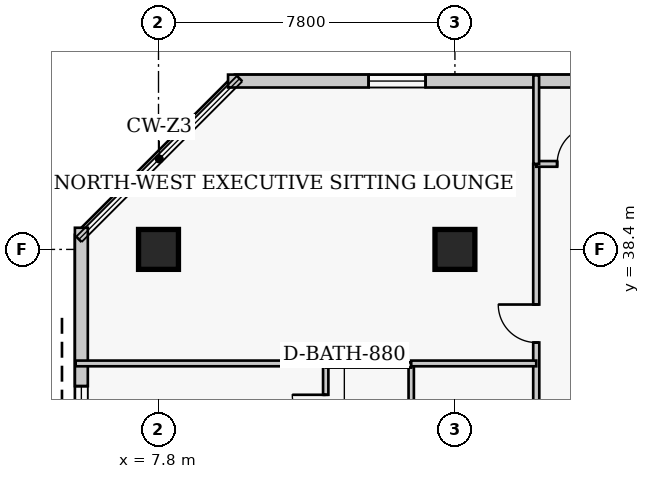
"""IFC4 building model, lengths in metres.
Left out: names, types, materials, properties, quantities, classifications, styles, units other than length and angle.
Written with IfcOpenShell. Run it as: python <this file> out.ifc"""

import sys

from ifc_helpers import new_model, si_unit, direction, frame, frame_2d, origin, origin_2d, place, context, subcontext, project, spatial, rectangle, extrude, element, fill, save


model = new_model("IFC4")
c1 = context("Model", 3, precision=1e-05, world=origin(), true_north=direction((0.0, 1.0)))
c2 = subcontext(c1, "Body", "Model", "MODEL_VIEW")
j1 = project(units=[si_unit("LENGTHUNIT", "METRE"), si_unit("PLANEANGLEUNIT", "RADIAN")], contexts=[c1])
p1 = place(None, origin())
s1 = spatial("IfcSite", under=j1, at=p1, CompositionType="ELEMENT")
p2 = place(p1, origin())
s2 = spatial("IfcBuilding", under=s1, at=p2, CompositionType="ELEMENT")
p3 = place(p2, frame((0.0, 0.0, 172.6)))
s3 = spatial("IfcBuildingStorey", under=s2, at=p3, CompositionType="ELEMENT", Elevation=172.6)
for number, where, z_axis, x_axis in (
    (1, (7.8, 38.4, 0.0), (0.0, 0.0, 1.0), (1.0, 0.0, 0.0)),
    (2, (15.6, 38.4, 0.0), (0.0, 0.0, 1.0), (1.0, 0.0, 0.0)),
):
    element("IfcColumn", number, at=place(p3, frame(where, z_axis=z_axis, x_axis=x_axis)), inside=s3, PredefinedType="COLUMN", context=c2, shape_type="SweptSolid", body=[
        extrude(rectangle(XDim=1.05, YDim=1.05, at=origin_2d()), origin(), (0.0, 0.0, 1.0), 3.8),
    ])
p4 = place(p3, frame((36.32, 42.83, 0.0), z_axis=(0.0, 0.0, 1.0), x_axis=(-1.0, 0.0, 0.0)))
e3 = element("IfcWall", 3, at=p4, inside=s3, PredefinedType="SOLIDWALL", context=c2, shape_type="SweptSolid", body=[
    extrude(rectangle(XDim=26.69, YDim=0.34, at=frame_2d((13.345, 0.0))), origin(), (0.0, 0.0, 1.0), 3.55),
])
p5 = place(p4, frame((2.548, 0.0, 0.85)))
e4 = element("IfcOpeningElement", 4, at=p5, cuts=e3, PredefinedType="OPENING", context=c2, shape_type="SweptSolid", body=[
    extrude(rectangle(XDim=1.5, YDim=1.75, at=frame_2d((0.75, 0.875))), frame((0.0, 0.18, 0.0), z_axis=(0.0, -1.0, 0.0), x_axis=(1.0, 0.0, 0.0)), (0.0, 0.0, 1.0), 0.36),
])
p6 = place(p4, frame((12.595, 0.0, 0.85)))
e5 = element("IfcOpeningElement", 5, at=p6, cuts=e3, PredefinedType="OPENING", context=c2, shape_type="SweptSolid", body=[
    extrude(rectangle(XDim=1.5, YDim=1.75, at=frame_2d((0.75, 0.875))), frame((0.0, 0.18, 0.0), z_axis=(0.0, -1.0, 0.0), x_axis=(1.0, 0.0, 0.0)), (0.0, 0.0, 1.0), 0.36),
])
p7 = place(p4, frame((21.492, 0.0, 0.85)))
e6 = element("IfcOpeningElement", 6, at=p7, cuts=e3, PredefinedType="OPENING", context=c2, shape_type="SweptSolid", body=[
    extrude(rectangle(XDim=1.5, YDim=1.75, at=frame_2d((0.75, 0.875))), frame((0.0, 0.18, 0.0), z_axis=(0.0, -1.0, 0.0), x_axis=(1.0, 0.0, 0.0)), (0.0, 0.0, 1.0), 0.36),
])
p8 = place(p3, frame((5.77, 38.97, 0.0), z_axis=(0.0, 0.0, 1.0), x_axis=(0.0, -1.0, 0.0)))
e7 = element("IfcWall", 7, at=p8, inside=s3, PredefinedType="SOLIDWALL", context=c2, shape_type="SweptSolid", body=[
    extrude(rectangle(XDim=30.14, YDim=0.34, at=frame_2d((15.07, 0.0))), origin(), (0.0, 0.0, 1.0), 3.55),
])
p9 = place(p8, frame((4.167, 0.0, 0.85)))
e8 = element("IfcOpeningElement", 8, at=p9, cuts=e7, PredefinedType="OPENING", context=c2, shape_type="SweptSolid", body=[
    extrude(rectangle(XDim=1.5, YDim=1.75, at=frame_2d((0.75, 0.875))), frame((0.0, 0.18, 0.0), z_axis=(0.0, -1.0, 0.0), x_axis=(1.0, 0.0, 0.0)), (0.0, 0.0, 1.0), 0.36),
])
p10 = place(p8, frame((10.552, 0.0, 0.85)))
e9 = element("IfcOpeningElement", 9, at=p10, cuts=e7, PredefinedType="OPENING", context=c2, shape_type="SweptSolid", body=[
    extrude(rectangle(XDim=1.5, YDim=1.75, at=frame_2d((0.75, 0.875))), frame((0.0, 0.18, 0.0), z_axis=(0.0, -1.0, 0.0), x_axis=(1.0, 0.0, 0.0)), (0.0, 0.0, 1.0), 0.36),
])
p11 = place(p8, frame((16.938, 0.0, 0.85)))
e10 = element("IfcOpeningElement", 10, at=p11, cuts=e7, PredefinedType="OPENING", context=c2, shape_type="SweptSolid", body=[
    extrude(rectangle(XDim=1.5, YDim=1.75, at=frame_2d((0.75, 0.875))), frame((0.0, 0.18, 0.0), z_axis=(0.0, -1.0, 0.0), x_axis=(1.0, 0.0, 0.0)), (0.0, 0.0, 1.0), 0.36),
])
p12 = place(p8, frame((25.623, 0.0, 0.85)))
e11 = element("IfcOpeningElement", 11, at=p12, cuts=e7, PredefinedType="OPENING", context=c2, shape_type="SweptSolid", body=[
    extrude(rectangle(XDim=1.5, YDim=1.75, at=frame_2d((0.75, 0.875))), frame((0.0, 0.18, 0.0), z_axis=(0.0, -1.0, 0.0), x_axis=(1.0, 0.0, 0.0)), (0.0, 0.0, 1.0), 0.36),
])
p13 = place(p3, frame((17.74, 6.85, 0.0), z_axis=(0.0, 0.0, 1.0), x_axis=(0.0, 1.0, 0.0)))
e12 = element("IfcWall", 12, at=p13, inside=s3, PredefinedType="PARTITIONING", context=c2, shape_type="SweptSolid", body=[
    extrude(rectangle(XDim=33.8, YDim=0.16, at=frame_2d((16.9, 0.0))), origin(), (0.0, 0.0, 1.0), 3.55),
])
p14 = place(p13, frame((1.7, 0.0, 0.0)))
e13 = element("IfcOpeningElement", 13, at=p14, cuts=e12, PredefinedType="OPENING", context=c2, shape_type="SweptSolid", body=[
    extrude(rectangle(XDim=0.95, YDim=2.1, at=frame_2d((0.475, 1.05))), frame((0.0, 0.09, 0.0), z_axis=(0.0, -1.0, 0.0), x_axis=(1.0, 0.0, 0.0)), (0.0, 0.0, 1.0), 0.18),
])
p15 = place(p13, frame((8.275, 0.0, 0.0)))
e14 = element("IfcOpeningElement", 14, at=p15, cuts=e12, PredefinedType="OPENING", context=c2, shape_type="SweptSolid", body=[
    extrude(rectangle(XDim=0.95, YDim=2.1, at=frame_2d((0.475, 1.05))), frame((0.0, 0.09, 0.0), z_axis=(0.0, -1.0, 0.0), x_axis=(1.0, 0.0, 0.0)), (0.0, 0.0, 1.0), 0.18),
])
p16 = place(p13, frame((17.075, 0.0, 0.0)))
e15 = element("IfcOpeningElement", 15, at=p16, cuts=e12, PredefinedType="OPENING", context=c2, shape_type="SweptSolid", body=[
    extrude(rectangle(XDim=0.95, YDim=2.1, at=frame_2d((0.475, 1.05))), frame((0.0, 0.09, 0.0), z_axis=(0.0, -1.0, 0.0), x_axis=(1.0, 0.0, 0.0)), (0.0, 0.0, 1.0), 0.18),
])
p17 = place(p13, frame((24.775, 0.0, 0.0)))
e16 = element("IfcOpeningElement", 16, at=p17, cuts=e12, PredefinedType="OPENING", context=c2, shape_type="SweptSolid", body=[
    extrude(rectangle(XDim=0.95, YDim=2.1, at=frame_2d((0.475, 1.05))), frame((0.0, 0.09, 0.0), z_axis=(0.0, -1.0, 0.0), x_axis=(1.0, 0.0, 0.0)), (0.0, 0.0, 1.0), 0.18),
])
p18 = place(p13, frame((29.1, 0.0, 0.0)))
e17 = element("IfcOpeningElement", 17, at=p18, cuts=e12, PredefinedType="OPENING", context=c2, shape_type="SweptSolid", body=[
    extrude(rectangle(XDim=1.0, YDim=2.15, at=frame_2d((0.5, 1.075))), frame((0.0, 0.09, 0.0), z_axis=(0.0, -1.0, 0.0), x_axis=(1.0, 0.0, 0.0)), (0.0, 0.0, 1.0), 0.18),
])
p19 = place(p3, frame((17.74, 40.65, 0.0), z_axis=(0.0, 0.0, 1.0), x_axis=(1.0, 0.0, 0.0)))
e18 = element("IfcWall", 18, at=p19, inside=s3, PredefinedType="PARTITIONING", context=c2, shape_type="SweptSolid", body=[
    extrude(rectangle(XDim=4.36, YDim=0.15, at=frame_2d((2.18, 0.0))), origin(), (0.0, 0.0, 1.0), 3.55),
])
p20 = place(p19, frame((0.55, 0.0, 0.0)))
e19 = element("IfcOpeningElement", 19, at=p20, cuts=e18, PredefinedType="OPENING", context=c2, shape_type="SweptSolid", body=[
    extrude(rectangle(XDim=1.0, YDim=2.15, at=frame_2d((0.5, 1.075))), frame((0.0, 0.085, 0.0), z_axis=(0.0, -1.0, 0.0), x_axis=(1.0, 0.0, 0.0)), (0.0, 0.0, 1.0), 0.17),
])
p21 = place(p3, frame((17.74, 40.65, 0.0), z_axis=(0.0, 0.0, 1.0), x_axis=(0.0, 1.0, 0.0)))
e20 = element("IfcWall", 20, at=p21, inside=s3, PredefinedType="PARTITIONING", context=c2, shape_type="SweptSolid", body=[
    extrude(rectangle(XDim=2.33, YDim=0.15, at=frame_2d((1.165, 0.0))), origin(), (0.0, 0.0, 1.0), 3.55),
])
p22 = place(p3, frame((12.2, 32.91, 0.0), z_axis=(0.0, 0.0, 1.0), x_axis=(0.0, 1.0, 0.0)))
e21 = element("IfcWall", 21, at=p22, inside=s3, PredefinedType="PLUMBINGWALL", context=c2, shape_type="SweptSolid", body=[
    extrude(rectangle(XDim=2.45, YDim=0.14, at=frame_2d((1.225, 0.0))), origin(), (0.0, 0.0, 1.0), 3.55),
])
p23 = place(p22, frame((0.785, 0.0, 0.0)))
e22 = element("IfcOpeningElement", 22, at=p23, cuts=e21, PredefinedType="OPENING", context=c2, shape_type="SweptSolid", body=[
    extrude(rectangle(XDim=0.88, YDim=2.05, at=frame_2d((0.44, 1.025))), frame((0.0, 0.08, 0.0), z_axis=(0.0, -1.0, 0.0), x_axis=(1.0, 0.0, 0.0)), (0.0, 0.0, 1.0), 0.16),
])
p24 = place(p3, frame((14.45, 32.91, 0.0), z_axis=(0.0, 0.0, 1.0), x_axis=(0.0, 1.0, 0.0)))
e23 = element("IfcWall", 23, at=p24, inside=s3, PredefinedType="PLUMBINGWALL", context=c2, shape_type="SweptSolid", body=[
    extrude(rectangle(XDim=2.45, YDim=0.14, at=frame_2d((1.225, 0.0))), origin(), (0.0, 0.0, 1.0), 3.55),
])
p25 = place(p3, frame((12.2, 35.36, 0.0), z_axis=(0.0, 0.0, 1.0), x_axis=(1.0, 0.0, 0.0)))
e24 = element("IfcWall", 24, at=p25, inside=s3, PredefinedType="PLUMBINGWALL", context=c2, shape_type="SweptSolid", body=[
    extrude(rectangle(XDim=2.25, YDim=0.14, at=frame_2d((1.125, 0.0))), origin(), (0.0, 0.0, 1.0), 3.55),
])
p26 = place(p3, frame((5.62, 35.4, 0.0), z_axis=(0.0, 0.0, 1.0), x_axis=(1.0, 0.0, 0.0)))
e25 = element("IfcWall", 25, at=p26, inside=s3, PredefinedType="PARTITIONING", context=c2, shape_type="SweptSolid", body=[
    extrude(rectangle(XDim=6.58, YDim=0.15, at=frame_2d((3.29, 0.0))), origin(), (0.0, 0.0, 1.0), 3.55),
])
p27 = place(p3, frame((14.45, 35.4, 0.0), z_axis=(0.0, 0.0, 1.0), x_axis=(1.0, 0.0, 0.0)))
e26 = element("IfcWall", 26, at=p27, inside=s3, PredefinedType="PARTITIONING", context=c2, shape_type="SweptSolid", body=[
    extrude(rectangle(XDim=3.29, YDim=0.15, at=frame_2d((1.645, 0.0))), origin(), (0.0, 0.0, 1.0), 3.55),
])
p28 = place(p7, origin())
e27 = element("IfcWindow", 27, at=p28, inside=s3, PartitioningType="SINGLE_PANEL", PredefinedType="WINDOW", context=c2, shape_type="SweptSolid", body=[
    extrude(rectangle(XDim=1.5, YDim=1.75, at=frame_2d((0.75, 0.875))), frame((0.0, 0.03, 0.0), z_axis=(0.0, -1.0, 0.0), x_axis=(1.0, 0.0, 0.0)), (0.0, 0.0, 1.0), 0.06),
])
fill(e6, e27)
p29 = place(p9, origin())
e28 = element("IfcWindow", 28, at=p29, inside=s3, PartitioningType="SINGLE_PANEL", PredefinedType="WINDOW", context=c2, shape_type="SweptSolid", body=[
    extrude(rectangle(XDim=1.5, YDim=1.75, at=frame_2d((0.75, 0.875))), frame((0.0, 0.03, 0.0), z_axis=(0.0, -1.0, 0.0), x_axis=(1.0, 0.0, 0.0)), (0.0, 0.0, 1.0), 0.06),
])
fill(e8, e28)
p30 = place(p20, origin())
e29 = element("IfcDoor", 29, at=p30, inside=s3, OperationType="SINGLE_SWING_RIGHT", PredefinedType="DOOR", context=c2, shape_type="SweptSolid", body=[
    extrude(rectangle(XDim=1.0, YDim=2.15, at=frame_2d((0.5, 1.075))), frame((0.0, 0.025, 0.0), z_axis=(0.0, -1.0, 0.0), x_axis=(1.0, 0.0, 0.0)), (0.0, 0.0, 1.0), 0.05),
])
fill(e19, e29)
p31 = place(p23, origin())
e30 = element("IfcDoor", 30, at=p31, inside=s3, OperationType="SINGLE_SWING_RIGHT", PredefinedType="DOOR", context=c2, shape_type="SweptSolid", body=[
    extrude(rectangle(XDim=0.88, YDim=2.05, at=frame_2d((0.44, 1.025))), frame((0.0, 0.025, 0.0), z_axis=(0.0, -1.0, 0.0), x_axis=(1.0, 0.0, 0.0)), (0.0, 0.0, 1.0), 0.05),
])
fill(e22, e30)
p32 = place(p18, origin())
e31 = element("IfcDoor", 31, at=p32, inside=s3, OperationType="SINGLE_SWING_RIGHT", PredefinedType="DOOR", context=c2, shape_type="SweptSolid", body=[
    extrude(rectangle(XDim=1.0, YDim=2.15, at=frame_2d((0.5, 1.075))), frame((0.0, 0.025, 0.0), z_axis=(0.0, -1.0, 0.0), x_axis=(1.0, 0.0, 0.0)), (0.0, 0.0, 1.0), 0.05),
])
fill(e17, e31)
save(model, sys.argv[1])
